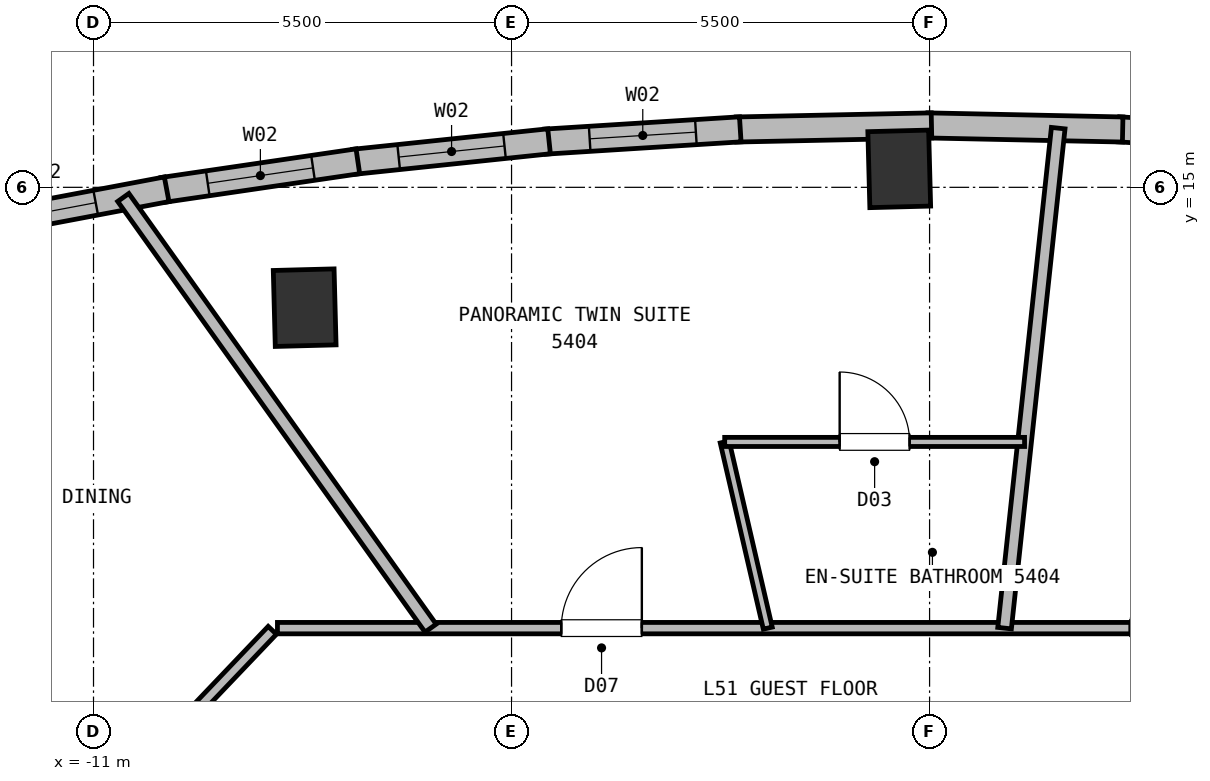
"""IFC4 building model, lengths in metres.
Left out: names, types, materials, properties, quantities, classifications, styles, units other than length and angle.
Written with IfcOpenShell. Run it as: python <this file> out.ifc"""

import sys

from ifc_helpers import new_model, si_unit, direction, frame, frame_2d, origin, origin_2d, place, context, subcontext, project, spatial, rectangle, extrude, element, fill, save


model = new_model("IFC4")
c1 = context("Model", 3, precision=1e-05, world=origin(), true_north=direction((0.0, 1.0)))
c2 = subcontext(c1, "Body", "Model", "MODEL_VIEW")
j1 = project(units=[si_unit("LENGTHUNIT", "METRE"), si_unit("PLANEANGLEUNIT", "RADIAN")], contexts=[c1])
p1 = place(None, origin())
s1 = spatial("IfcSite", under=j1, at=p1, CompositionType="ELEMENT")
p2 = place(p1, origin())
s2 = spatial("IfcBuilding", under=s1, at=p2, CompositionType="ELEMENT")
p3 = place(p2, frame((0.0, 0.0, 205.55)))
s3 = spatial("IfcBuildingStorey", under=s2, at=p3, CompositionType="ELEMENT", Elevation=205.55)
for number, where, z_axis, x_axis in (
    (1, (-0.399, 15.243, 0.0), (0.0, 0.0, 1.0), (1.0, 0.026, 0.0)),
    (2, (-8.222, 13.417, 0.0), (0.0, 0.0, 1.0), (1.0, 0.026, 0.0)),
):
    element("IfcColumn", number, at=place(p3, frame(where, z_axis=z_axis, x_axis=x_axis)), inside=s3, PredefinedType="COLUMN", context=c2, shape_type="SweptSolid", body=[
        extrude(rectangle(XDim=0.8, YDim=1.0, at=origin_2d()), origin(), (0.0, 0.0, 1.0), 3.8),
    ])
p4 = place(p3, frame((2.49, 15.763, 0.0), z_axis=(0.0, 0.0, 1.0), x_axis=(0.998021787146, -0.062869009715, 0.0)))
e3 = element("IfcWall", 3, at=p4, inside=s3, PredefinedType="SOLIDWALL", context=c2, shape_type="SweptSolid", body=[
    extrude(rectangle(XDim=2.571, YDim=0.33, at=frame_2d((1.285, 0.0))), origin(), (0.0, 0.0, 1.0), 3.55),
])
p5 = place(p4, frame((0.585, 0.0, 0.72)))
e4 = element("IfcOpeningElement", 4, at=p5, cuts=e3, PredefinedType="OPENING", context=c2, shape_type="SweptSolid", body=[
    extrude(rectangle(XDim=1.4, YDim=1.84, at=frame_2d((0.7, 0.92))), frame((0.0, 0.175, 0.0), z_axis=(0.0, -1.0, 0.0), x_axis=(1.0, 0.0, 0.0)), (0.0, 0.0, 1.0), 0.35),
])
for number, where, z_axis, x_axis in (
    (5, (-0.025, 15.815, 0.0), (0.0, 0.0, 1.0), (1.0, -0.021, 0.0)),
    (6, (-2.541, 15.761, 0.0), (0.0, 0.0, 1.0), (1.0, 0.021, 0.0)),
):
    element("IfcWall", number, at=place(p3, frame(where, z_axis=z_axis, x_axis=x_axis)), inside=s3, PredefinedType="SOLIDWALL", context=c2, shape_type="SweptSolid", body=[
        extrude(rectangle(XDim=2.566, YDim=0.33, at=frame_2d((1.283, 0.0))), origin(), (0.0, 0.0, 1.0), 3.55),
    ])
p6 = place(p3, frame((-5.056, 15.601, 0.0), z_axis=(0.0, 0.0, 1.0), x_axis=(0.998021787146, 0.062869009715, 0.0)))
e7 = element("IfcWall", 7, at=p6, inside=s3, PredefinedType="SOLIDWALL", context=c2, shape_type="SweptSolid", body=[
    extrude(rectangle(XDim=2.571, YDim=0.33, at=frame_2d((1.285, 0.0))), origin(), (0.0, 0.0, 1.0), 3.55),
])
p7 = place(p6, frame((0.585, 0.0, 0.72)))
e8 = element("IfcOpeningElement", 8, at=p7, cuts=e7, PredefinedType="OPENING", context=c2, shape_type="SweptSolid", body=[
    extrude(rectangle(XDim=1.4, YDim=1.84, at=frame_2d((0.7, 0.92))), frame((0.0, 0.175, 0.0), z_axis=(0.0, -1.0, 0.0), x_axis=(1.0, 0.0, 0.0)), (0.0, 0.0, 1.0), 0.35),
])
p8 = place(p3, frame((-7.572, 15.336, 0.0), z_axis=(0.0, 0.0, 1.0), x_axis=(0.994536008198, 0.104394101355, 0.0)))
e9 = element("IfcWall", 9, at=p8, inside=s3, PredefinedType="SOLIDWALL", context=c2, shape_type="SweptSolid", body=[
    extrude(rectangle(XDim=2.58, YDim=0.33, at=frame_2d((1.29, 0.0))), origin(), (0.0, 0.0, 1.0), 3.55),
])
p9 = place(p8, frame((0.59, 0.0, 0.72)))
e10 = element("IfcOpeningElement", 10, at=p9, cuts=e9, PredefinedType="OPENING", context=c2, shape_type="SweptSolid", body=[
    extrude(rectangle(XDim=1.4, YDim=1.84, at=frame_2d((0.7, 0.92))), frame((0.0, 0.175, 0.0), z_axis=(0.0, -1.0, 0.0), x_axis=(1.0, 0.0, 0.0)), (0.0, 0.0, 1.0), 0.35),
])
p10 = place(p3, frame((-10.087, 14.966, 0.0), z_axis=(0.0, 0.0, 1.0), x_axis=(0.989386229934, 0.145309628097, 0.0)))
e11 = element("IfcWall", 11, at=p10, inside=s3, PredefinedType="SOLIDWALL", context=c2, shape_type="SweptSolid", body=[
    extrude(rectangle(XDim=2.593, YDim=0.33, at=frame_2d((1.296, 0.0))), origin(), (0.0, 0.0, 1.0), 3.55),
])
p11 = place(p10, frame((0.596, 0.0, 0.72)))
e12 = element("IfcOpeningElement", 12, at=p11, cuts=e11, PredefinedType="OPENING", context=c2, shape_type="SweptSolid", body=[
    extrude(rectangle(XDim=1.4, YDim=1.84, at=frame_2d((0.7, 0.92))), frame((0.0, 0.175, 0.0), z_axis=(0.0, -1.0, 0.0), x_axis=(1.0, 0.0, 0.0)), (0.0, 0.0, 1.0), 0.35),
])
p12 = place(p3, frame((-12.602, 14.49, 0.0), z_axis=(0.0, 0.0, 1.0), x_axis=(0.982628840182, 0.185581686713, 0.0)))
e13 = element("IfcWall", 13, at=p12, inside=s3, PredefinedType="SOLIDWALL", context=c2, shape_type="SweptSolid", body=[
    extrude(rectangle(XDim=2.61, YDim=0.33, at=frame_2d((1.305, 0.0))), origin(), (0.0, 0.0, 1.0), 3.55),
])
p13 = place(p12, frame((0.26, 0.0, 0.72)))
e14 = element("IfcOpeningElement", 14, at=p13, cuts=e13, PredefinedType="OPENING", context=c2, shape_type="SweptSolid", body=[
    extrude(rectangle(XDim=1.4, YDim=1.84, at=frame_2d((0.7, 0.92))), frame((0.0, 0.175, 0.0), z_axis=(0.0, -1.0, 0.0), x_axis=(1.0, 0.0, 0.0)), (0.0, 0.0, 1.0), 0.35),
])
p14 = place(p3, frame((-8.58, 9.2, 0.0), z_axis=(0.0, 0.0, 1.0), x_axis=(1.0, 0.0, 0.0)))
e15 = element("IfcWall", 15, at=p14, inside=s3, PredefinedType="PARTITIONING", context=c2, shape_type="SweptSolid", body=[
    extrude(rectangle(XDim=17.16, YDim=0.15, at=frame_2d((8.58, 0.0))), origin(), (0.0, 0.0, 1.0), 3.55),
])
p15 = place(p14, frame((3.734, 0.0, 0.0)))
e16 = element("IfcOpeningElement", 16, at=p15, cuts=e15, PredefinedType="OPENING", context=c2, shape_type="SweptSolid", body=[
    extrude(rectangle(XDim=1.06, YDim=2.15, at=frame_2d((0.53, 1.075))), frame((0.0, 0.085, 0.0), z_axis=(0.0, -1.0, 0.0), x_axis=(1.0, 0.0, 0.0)), (0.0, 0.0, 1.0), 0.17),
])
p16 = place(p14, frame((11.214, 0.0, 0.0)))
e17 = element("IfcOpeningElement", 17, at=p16, cuts=e15, PredefinedType="OPENING", context=c2, shape_type="SweptSolid", body=[
    extrude(rectangle(XDim=1.06, YDim=2.15, at=frame_2d((0.53, 1.075))), frame((0.0, 0.085, 0.0), z_axis=(0.0, -1.0, 0.0), x_axis=(1.0, 0.0, 0.0)), (0.0, 0.0, 1.0), 0.17),
])
p17 = place(p3, frame((-10.422, 7.309, 0.0), z_axis=(0.0, 0.0, 1.0), x_axis=(0.689960858356, 0.723846678473, 0.0)))
e18 = element("IfcWall", 18, at=p17, inside=s3, PredefinedType="PARTITIONING", context=c2, shape_type="SweptSolid", body=[
    extrude(rectangle(XDim=2.572, YDim=0.15, at=frame_2d((1.286, 0.0))), origin(), (0.0, 0.0, 1.0), 3.55),
])
p18 = place(p3, frame((0.987, 9.2, 0.0), z_axis=(0.0, 0.0, 1.0), x_axis=(0.106639959808, 0.994297701381, 0.0)))
e19 = element("IfcWall", 19, at=p18, inside=s3, PredefinedType="PARTITIONING", context=c2, shape_type="SweptSolid", body=[
    extrude(rectangle(XDim=6.616, YDim=0.18, at=frame_2d((3.308, 0.0))), origin(), (0.0, 0.0, 1.0), 3.55),
])
p19 = place(p3, frame((-2.129, 9.2, 0.0), z_axis=(0.0, 0.0, 1.0), x_axis=(-0.225433802515, 0.974258487612, 0.0)))
e20 = element("IfcWall", 20, at=p19, inside=s3, PredefinedType="PARTITIONING", context=c2, shape_type="SweptSolid", body=[
    extrude(rectangle(XDim=2.515, YDim=0.12, at=frame_2d((1.257, 0.0))), origin(), (0.0, 0.0, 1.0), 3.55),
])
p20 = place(p3, frame((-2.696, 11.65, 0.0), z_axis=(0.0, 0.0, 1.0), x_axis=(1.0, 0.0, 0.0)))
e21 = element("IfcWall", 21, at=p20, inside=s3, PredefinedType="PARTITIONING", context=c2, shape_type="SweptSolid", body=[
    extrude(rectangle(XDim=3.945, YDim=0.12, at=frame_2d((1.973, 0.0))), origin(), (0.0, 0.0, 1.0), 3.55),
])
p21 = place(p20, frame((1.513, 0.0, 0.0)))
e22 = element("IfcOpeningElement", 22, at=p21, cuts=e21, PredefinedType="OPENING", context=c2, shape_type="SweptSolid", body=[
    extrude(rectangle(XDim=0.92, YDim=2.1, at=frame_2d((0.46, 1.05))), frame((0.0, 0.07, 0.0), z_axis=(0.0, -1.0, 0.0), x_axis=(1.0, 0.0, 0.0)), (0.0, 0.0, 1.0), 0.14),
])
p22 = place(p3, frame((-6.565, 9.2, 0.0), z_axis=(0.0, 0.0, 1.0), x_axis=(-0.580836708582, 0.814020096781, 0.0)))
e23 = element("IfcWall", 23, at=p22, inside=s3, PredefinedType="PARTITIONING", context=c2, shape_type="SweptSolid", body=[
    extrude(rectangle(XDim=6.961, YDim=0.18, at=frame_2d((3.481, 0.0))), origin(), (0.0, 0.0, 1.0), 3.55),
])
p23 = place(p7, origin())
e24 = element("IfcWindow", 24, at=p23, inside=s3, PartitioningType="SINGLE_PANEL", PredefinedType="WINDOW", context=c2, shape_type="SweptSolid", body=[
    extrude(rectangle(XDim=1.4, YDim=1.84, at=frame_2d((0.7, 0.92))), frame((0.0, 0.03, 0.0), z_axis=(0.0, -1.0, 0.0), x_axis=(1.0, 0.0, 0.0)), (0.0, 0.0, 1.0), 0.06),
])
fill(e8, e24)
p24 = place(p9, origin())
e25 = element("IfcWindow", 25, at=p24, inside=s3, PartitioningType="SINGLE_PANEL", PredefinedType="WINDOW", context=c2, shape_type="SweptSolid", body=[
    extrude(rectangle(XDim=1.4, YDim=1.84, at=frame_2d((0.7, 0.92))), frame((0.0, 0.03, 0.0), z_axis=(0.0, -1.0, 0.0), x_axis=(1.0, 0.0, 0.0)), (0.0, 0.0, 1.0), 0.06),
])
fill(e10, e25)
p25 = place(p11, origin())
e26 = element("IfcWindow", 26, at=p25, inside=s3, PartitioningType="SINGLE_PANEL", PredefinedType="WINDOW", context=c2, shape_type="SweptSolid", body=[
    extrude(rectangle(XDim=1.4, YDim=1.84, at=frame_2d((0.7, 0.92))), frame((0.0, 0.03, 0.0), z_axis=(0.0, -1.0, 0.0), x_axis=(1.0, 0.0, 0.0)), (0.0, 0.0, 1.0), 0.06),
])
fill(e12, e26)
p26 = place(p13, origin())
e27 = element("IfcWindow", 27, at=p26, inside=s3, PartitioningType="SINGLE_PANEL", PredefinedType="WINDOW", context=c2, shape_type="SweptSolid", body=[
    extrude(rectangle(XDim=1.4, YDim=1.84, at=frame_2d((0.7, 0.92))), frame((0.0, 0.03, 0.0), z_axis=(0.0, -1.0, 0.0), x_axis=(1.0, 0.0, 0.0)), (0.0, 0.0, 1.0), 0.06),
])
fill(e14, e27)
p27 = place(p21, origin())
e28 = element("IfcDoor", 28, at=p27, inside=s3, OperationType="SINGLE_SWING_LEFT", PredefinedType="DOOR", context=c2, shape_type="SweptSolid", body=[
    extrude(rectangle(XDim=0.92, YDim=2.1, at=frame_2d((0.46, 1.05))), frame((0.0, 0.025, 0.0), z_axis=(0.0, -1.0, 0.0), x_axis=(1.0, 0.0, 0.0)), (0.0, 0.0, 1.0), 0.05),
])
fill(e22, e28)
p28 = place(p15, origin())
e29 = element("IfcDoor", 29, at=p28, inside=s3, OperationType="SINGLE_SWING_RIGHT", PredefinedType="DOOR", context=c2, shape_type="SweptSolid", body=[
    extrude(rectangle(XDim=1.06, YDim=2.15, at=frame_2d((0.53, 1.075))), frame((0.0, 0.025, 0.0), z_axis=(0.0, -1.0, 0.0), x_axis=(1.0, 0.0, 0.0)), (0.0, 0.0, 1.0), 0.05),
])
fill(e16, e29)
p29 = place(p16, origin())
e30 = element("IfcDoor", 30, at=p29, inside=s3, OperationType="SINGLE_SWING_RIGHT", PredefinedType="DOOR", context=c2, shape_type="SweptSolid", body=[
    extrude(rectangle(XDim=1.06, YDim=2.15, at=frame_2d((0.53, 1.075))), frame((0.0, 0.025, 0.0), z_axis=(0.0, -1.0, 0.0), x_axis=(1.0, 0.0, 0.0)), (0.0, 0.0, 1.0), 0.05),
])
fill(e17, e30)
save(model, sys.argv[1])
